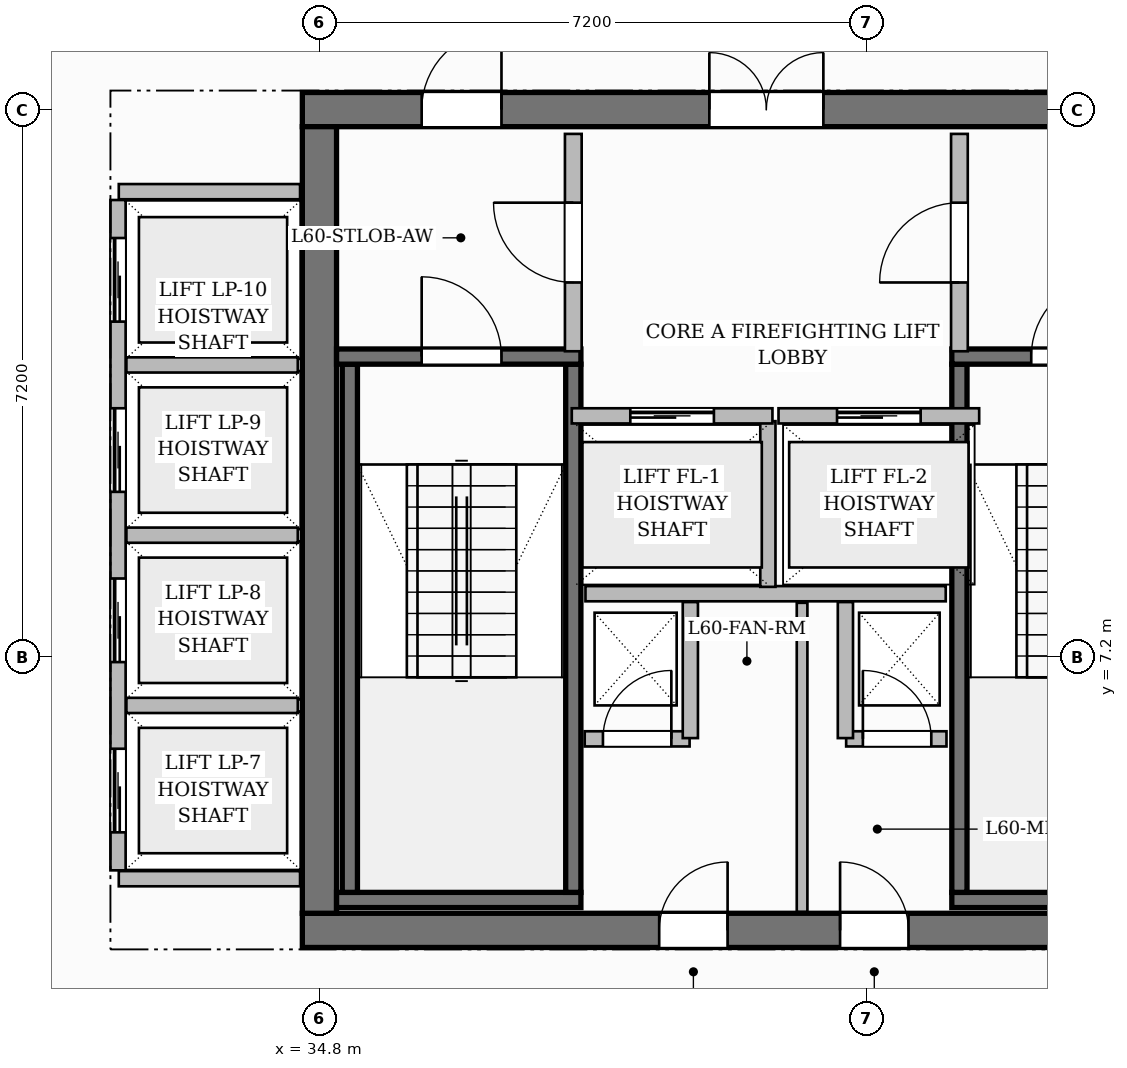
"""IFC4 building model, lengths in metres.
Left out: names, types, materials, properties, quantities, classifications, styles, units other than length and angle.
Written with IfcOpenShell. Run it as: python <this file> out.ifc"""

import sys

from ifc_helpers import new_model, si_unit, direction, frame, frame_2d, origin, place, context, subcontext, project, spatial, rectangle, extrude, source, transform, mapped, element, fill, save


model = new_model("IFC4")
c1 = context("Model", 3, precision=1e-05, world=origin(), true_north=direction((0.0, 1.0)))
c2 = subcontext(c1, "Body", "Model", "MODEL_VIEW")
j1 = project(units=[si_unit("LENGTHUNIT", "METRE"), si_unit("PLANEANGLEUNIT", "RADIAN")], contexts=[c1])
p1 = place(None, origin())
s1 = spatial("IfcSite", under=j1, at=p1, CompositionType="ELEMENT")
p2 = place(p1, origin())
s2 = spatial("IfcBuilding", under=s1, at=p2, CompositionType="ELEMENT")
p3 = place(p2, frame((0.0, 0.0, 240.4)))
s3 = spatial("IfcBuildingStorey", under=s2, at=p3, CompositionType="ELEMENT", Elevation=240.4)
p4 = place(p3, frame((34.575, 3.6, 0.0), z_axis=(0.0, 0.0, 1.0), x_axis=(1.0, 0.0, 0.0)))
e1 = element("IfcWall", 1, at=p4, inside=s3, PredefinedType="SHEAR", context=c2, shape_type="SweptSolid", body=[
    extrude(rectangle(XDim=15.45, YDim=0.45, at=frame_2d((7.725, 0.0))), origin(), (0.0, 0.0, 1.0), 3.85),
])
p5 = place(p4, frame((4.695, 0.0, 0.0)))
e2 = element("IfcOpeningElement", 2, at=p5, cuts=e1, PredefinedType="OPENING", context=c2, shape_type="SweptSolid", body=[
    extrude(rectangle(XDim=0.9, YDim=2.1, at=frame_2d((0.45, 1.05))), frame((0.0, 0.235, 0.0), z_axis=(0.0, -1.0, 0.0), x_axis=(1.0, 0.0, 0.0)), (0.0, 0.0, 1.0), 0.47),
])
p6 = place(p4, frame((7.075, 0.0, 0.0)))
e3 = element("IfcOpeningElement", 3, at=p6, cuts=e1, PredefinedType="OPENING", context=c2, shape_type="SweptSolid", body=[
    extrude(rectangle(XDim=0.9, YDim=2.1, at=frame_2d((0.45, 1.05))), frame((0.0, 0.235, 0.0), z_axis=(0.0, -1.0, 0.0), x_axis=(1.0, 0.0, 0.0)), (0.0, 0.0, 1.0), 0.47),
])
p7 = place(p3, frame((34.575, 14.4, 0.0), z_axis=(0.0, 0.0, 1.0), x_axis=(1.0, 0.0, 0.0)))
e4 = element("IfcWall", 4, at=p7, inside=s3, PredefinedType="SHEAR", context=c2, shape_type="SweptSolid", body=[
    extrude(rectangle(XDim=15.45, YDim=0.45, at=frame_2d((7.725, 0.0))), origin(), (0.0, 0.0, 1.0), 3.85),
])
p8 = place(p7, frame((5.355, 0.0, 0.0)))
e5 = element("IfcOpeningElement", 5, at=p8, cuts=e4, PredefinedType="OPENING", context=c2, shape_type="SweptSolid", body=[
    extrude(rectangle(XDim=1.5, YDim=2.2, at=frame_2d((0.75, 1.1))), frame((0.0, 0.235, 0.0), z_axis=(0.0, -1.0, 0.0), x_axis=(1.0, 0.0, 0.0)), (0.0, 0.0, 1.0), 0.47),
])
p9 = place(p7, frame((1.57, 0.0, 0.0)))
e6 = element("IfcOpeningElement", 6, at=p9, cuts=e4, PredefinedType="OPENING", context=c2, shape_type="SweptSolid", body=[
    extrude(rectangle(XDim=1.05, YDim=2.15, at=frame_2d((0.525, 1.075))), frame((0.0, 0.235, 0.0), z_axis=(0.0, -1.0, 0.0), x_axis=(1.0, 0.0, 0.0)), (0.0, 0.0, 1.0), 0.47),
])
p10 = place(p7, frame((11.2, 0.0, 0.0)))
e7 = element("IfcOpeningElement", 7, at=p10, cuts=e4, PredefinedType="OPENING", context=c2, shape_type="SweptSolid", body=[
    extrude(rectangle(XDim=1.05, YDim=2.15, at=frame_2d((0.525, 1.075))), frame((0.0, 0.235, 0.0), z_axis=(0.0, -1.0, 0.0), x_axis=(1.0, 0.0, 0.0)), (0.0, 0.0, 1.0), 0.47),
])
p11 = place(p3, frame((34.8, 3.825, 0.0), z_axis=(0.0, 0.0, 1.0), x_axis=(0.0, 1.0, 0.0)))
e8 = element("IfcWall", 8, at=p11, inside=s3, PredefinedType="SHEAR", context=c2, shape_type="SweptSolid", body=[
    extrude(rectangle(XDim=10.35, YDim=0.45, at=frame_2d((5.175, 0.0))), origin(), (0.0, 0.0, 1.0), 3.85),
])
p12 = place(p3, frame((35.025, 4.0, 0.0), z_axis=(0.0, 0.0, 1.0), x_axis=(1.0, 0.0, 0.0)))
e9 = element("IfcWall", 9, at=p12, inside=s3, PredefinedType="SHEAR", context=c2, shape_type="SweptSolid", body=[
    extrude(rectangle(XDim=3.215, YDim=0.2, at=frame_2d((1.607, 0.0))), origin(), (0.0, 0.0, 1.0), 3.85),
])
for number, where, z_axis, x_axis in (
    (10, (35.2, 4.1, 0.0), (0.0, 0.0, 1.0), (0.0, 1.0, 0.0)),
    (11, (38.14, 4.1, 0.0), (0.0, 0.0, 1.0), (0.0, 1.0, 0.0)),
):
    element("IfcWall", number, at=place(p3, frame(where, z_axis=z_axis, x_axis=x_axis)), inside=s3, PredefinedType="SHEAR", context=c2, shape_type="SweptSolid", body=[
        extrude(rectangle(XDim=6.95, YDim=0.2, at=frame_2d((3.475, 0.0))), origin(), (0.0, 0.0, 1.0), 3.85),
    ])
p13 = place(p3, frame((35.025, 11.15, 0.0), z_axis=(0.0, 0.0, 1.0), x_axis=(1.0, 0.0, 0.0)))
e12 = element("IfcWall", 12, at=p13, inside=s3, PredefinedType="SHEAR", context=c2, shape_type="SweptSolid", body=[
    extrude(rectangle(XDim=3.215, YDim=0.2, at=frame_2d((1.607, 0.0))), origin(), (0.0, 0.0, 1.0), 3.85),
])
p14 = place(p13, frame((1.12, 0.0, 0.0)))
e13 = element("IfcOpeningElement", 13, at=p14, cuts=e12, PredefinedType="OPENING", context=c2, shape_type="SweptSolid", body=[
    extrude(rectangle(XDim=1.05, YDim=2.2, at=frame_2d((0.525, 1.1))), frame((0.0, 0.11, 0.0), z_axis=(0.0, -1.0, 0.0), x_axis=(1.0, 0.0, 0.0)), (0.0, 0.0, 1.0), 0.22),
])
p15 = place(p3, frame((43.12, 4.0, 0.0), z_axis=(0.0, 0.0, 1.0), x_axis=(1.0, 0.0, 0.0)))
e14 = element("IfcWall", 14, at=p15, inside=s3, PredefinedType="SHEAR", context=c2, shape_type="SweptSolid", body=[
    extrude(rectangle(XDim=6.455, YDim=0.2, at=frame_2d((3.228, 0.0))), origin(), (0.0, 0.0, 1.0), 3.85),
])
p16 = place(p3, frame((43.22, 4.1, 0.0), z_axis=(0.0, 0.0, 1.0), x_axis=(0.0, 1.0, 0.0)))
e15 = element("IfcWall", 15, at=p16, inside=s3, PredefinedType="SHEAR", context=c2, shape_type="SweptSolid", body=[
    extrude(rectangle(XDim=6.95, YDim=0.2, at=frame_2d((3.475, 0.0))), origin(), (0.0, 0.0, 1.0), 3.85),
])
p17 = place(p3, frame((43.12, 11.15, 0.0), z_axis=(0.0, 0.0, 1.0), x_axis=(1.0, 0.0, 0.0)))
e16 = element("IfcWall", 16, at=p17, inside=s3, PredefinedType="SHEAR", context=c2, shape_type="SweptSolid", body=[
    extrude(rectangle(XDim=6.455, YDim=0.2, at=frame_2d((3.228, 0.0))), origin(), (0.0, 0.0, 1.0), 3.85),
])
p18 = place(p17, frame((1.045, 0.0, 0.0)))
e17 = element("IfcOpeningElement", 17, at=p18, cuts=e16, PredefinedType="OPENING", context=c2, shape_type="SweptSolid", body=[
    extrude(rectangle(XDim=1.05, YDim=2.2, at=frame_2d((0.525, 1.1))), frame((0.0, 0.11, 0.0), z_axis=(0.0, -1.0, 0.0), x_axis=(1.0, 0.0, 0.0)), (0.0, 0.0, 1.0), 0.22),
])
p19 = place(p17, frame((4.125, 0.0, 0.0)))
e18 = element("IfcOpeningElement", 18, at=p19, cuts=e16, PredefinedType="OPENING", context=c2, shape_type="SweptSolid", body=[
    extrude(rectangle(XDim=1.05, YDim=2.2, at=frame_2d((0.525, 1.1))), frame((0.0, 0.11, 0.0), z_axis=(0.0, -1.0, 0.0), x_axis=(1.0, 0.0, 0.0)), (0.0, 0.0, 1.0), 0.22),
])
p20 = place(p3, frame((38.3, 8.03, 0.0), z_axis=(0.0, 0.0, 1.0), x_axis=(1.0, 0.0, 0.0)))
e19 = element("IfcWall", 19, at=p20, inside=s3, PredefinedType="PARTITIONING", context=c2, shape_type="SweptSolid", body=[
    extrude(rectangle(XDim=4.74, YDim=0.2, at=frame_2d((2.37, 0.0))), origin(), (0.0, 0.0, 1.0), 3.6),
])
p21 = place(p3, frame((40.7, 8.12, 0.0), z_axis=(0.0, 0.0, 1.0), x_axis=(0.0, 1.0, 0.0)))
e20 = element("IfcWall", 20, at=p21, inside=s3, PredefinedType="PARTITIONING", context=c2, shape_type="SweptSolid", body=[
    extrude(rectangle(XDim=2.18, YDim=0.2, at=frame_2d((1.09, 0.0))), origin(), (0.0, 0.0, 1.0), 3.6),
])
p22 = place(p3, frame((38.14, 11.22, 0.0), z_axis=(0.0, 0.0, 1.0), x_axis=(0.0, 1.0, 0.0)))
e21 = element("IfcWall", 21, at=p22, inside=s3, PredefinedType="PARTITIONING", context=c2, shape_type="SweptSolid", body=[
    extrude(rectangle(XDim=2.86, YDim=0.22, at=frame_2d((1.43, 0.0))), origin(), (0.0, 0.0, 1.0), 3.6),
])
p23 = place(p22, frame((0.905, 0.0, 0.0)))
e22 = element("IfcOpeningElement", 22, at=p23, cuts=e21, PredefinedType="OPENING", context=c2, shape_type="SweptSolid", body=[
    extrude(rectangle(XDim=1.05, YDim=2.15, at=frame_2d((0.525, 1.075))), frame((0.0, 0.12, 0.0), z_axis=(0.0, -1.0, 0.0), x_axis=(1.0, 0.0, 0.0)), (0.0, 0.0, 1.0), 0.24),
])
p24 = place(p3, frame((43.22, 11.22, 0.0), z_axis=(0.0, 0.0, 1.0), x_axis=(0.0, 1.0, 0.0)))
e23 = element("IfcWall", 23, at=p24, inside=s3, PredefinedType="PARTITIONING", context=c2, shape_type="SweptSolid", body=[
    extrude(rectangle(XDim=2.86, YDim=0.22, at=frame_2d((1.43, 0.0))), origin(), (0.0, 0.0, 1.0), 3.6),
])
p25 = place(p24, frame((0.905, 0.0, 0.0)))
e24 = element("IfcOpeningElement", 24, at=p25, cuts=e23, PredefinedType="OPENING", context=c2, shape_type="SweptSolid", body=[
    extrude(rectangle(XDim=1.05, YDim=2.15, at=frame_2d((0.525, 1.075))), frame((0.0, 0.12, 0.0), z_axis=(0.0, -1.0, 0.0), x_axis=(1.0, 0.0, 0.0)), (0.0, 0.0, 1.0), 0.24),
])
p26 = place(p3, frame((38.29, 6.12, 0.0), z_axis=(0.0, 0.0, 1.0), x_axis=(1.0, 0.0, 0.0)))
e25 = element("IfcWall", 25, at=p26, inside=s3, PredefinedType="PARTITIONING", context=c2, shape_type="SweptSolid", body=[
    extrude(rectangle(XDim=1.38, YDim=0.2, at=frame_2d((0.69, 0.0))), origin(), (0.0, 0.0, 1.0), 3.6),
])
p27 = place(p26, frame((0.24, 0.0, 0.0)))
e26 = element("IfcOpeningElement", 26, at=p27, cuts=e25, PredefinedType="OPENING", context=c2, shape_type="SweptSolid", body=[
    extrude(rectangle(XDim=0.9, YDim=2.1, at=frame_2d((0.45, 1.05))), frame((0.0, 0.11, 0.0), z_axis=(0.0, -1.0, 0.0), x_axis=(1.0, 0.0, 0.0)), (0.0, 0.0, 1.0), 0.22),
])
p28 = place(p3, frame((39.68, 6.13, 0.0), z_axis=(0.0, 0.0, 1.0), x_axis=(0.0, 1.0, 0.0)))
e27 = element("IfcWall", 27, at=p28, inside=s3, PredefinedType="PARTITIONING", context=c2, shape_type="SweptSolid", body=[
    extrude(rectangle(XDim=1.79, YDim=0.2, at=frame_2d((0.895, 0.0))), origin(), (0.0, 0.0, 1.0), 3.6),
])
p29 = place(p3, frame((41.73, 6.12, 0.0), z_axis=(0.0, 0.0, 1.0), x_axis=(1.0, 0.0, 0.0)))
e28 = element("IfcWall", 28, at=p29, inside=s3, PredefinedType="PARTITIONING", context=c2, shape_type="SweptSolid", body=[
    extrude(rectangle(XDim=1.32, YDim=0.2, at=frame_2d((0.66, 0.0))), origin(), (0.0, 0.0, 1.0), 3.6),
])
p30 = place(p29, frame((0.22, 0.0, 0.0)))
e29 = element("IfcOpeningElement", 29, at=p30, cuts=e28, PredefinedType="OPENING", context=c2, shape_type="SweptSolid", body=[
    extrude(rectangle(XDim=0.9, YDim=2.1, at=frame_2d((0.45, 1.05))), frame((0.0, 0.11, 0.0), z_axis=(0.0, -1.0, 0.0), x_axis=(1.0, 0.0, 0.0)), (0.0, 0.0, 1.0), 0.22),
])
p31 = place(p3, frame((41.72, 6.13, 0.0), z_axis=(0.0, 0.0, 1.0), x_axis=(0.0, 1.0, 0.0)))
e30 = element("IfcWall", 30, at=p31, inside=s3, PredefinedType="PARTITIONING", context=c2, shape_type="SweptSolid", body=[
    extrude(rectangle(XDim=1.79, YDim=0.2, at=frame_2d((0.895, 0.0))), origin(), (0.0, 0.0, 1.0), 3.6),
])
p32 = place(p3, frame((41.15, 3.845, 0.0), z_axis=(0.0, 0.0, 1.0), x_axis=(0.0, 1.0, 0.0)))
e31 = element("IfcWall", 31, at=p32, inside=s3, PredefinedType="PARTITIONING", context=c2, shape_type="SweptSolid", body=[
    extrude(rectangle(XDim=4.065, YDim=0.14, at=frame_2d((2.032, 0.0))), origin(), (0.0, 0.0, 1.0), 3.6),
])
for number, where, z_axis, x_axis in (
    (32, (32.16, 4.28, 0.0), (0.0, 0.0, 1.0), (1.0, 0.0, 0.0)),
    (33, (32.16, 13.32, 0.0), (0.0, 0.0, 1.0), (1.0, 0.0, 0.0)),
):
    element("IfcWall", number, at=place(p3, frame(where, z_axis=z_axis, x_axis=x_axis)), inside=s3, PredefinedType="PARTITIONING", context=c2, shape_type="SweptSolid", body=[
        extrude(rectangle(XDim=2.385, YDim=0.2, at=frame_2d((1.192, 0.0))), origin(), (0.0, 0.0, 1.0), 3.6),
    ])
p33 = place(p3, frame((32.15, 4.39, 0.0), z_axis=(0.0, 0.0, 1.0), x_axis=(0.0, 1.0, 0.0)))
e34 = element("IfcWall", 34, at=p33, inside=s3, PredefinedType="PARTITIONING", context=c2, shape_type="SweptSolid", body=[
    extrude(rectangle(XDim=8.82, YDim=0.2, at=frame_2d((4.41, 0.0))), origin(), (0.0, 0.0, 1.0), 3.6),
])
p34 = place(p33, frame((0.5, 0.0, 0.0)))
e35 = element("IfcOpeningElement", 35, at=p34, cuts=e34, PredefinedType="OPENING", context=c2, shape_type="SweptSolid", body=[
    extrude(rectangle(XDim=1.1, YDim=2.2, at=frame_2d((0.55, 1.1))), frame((0.0, 0.11, 0.0), z_axis=(0.0, -1.0, 0.0), x_axis=(1.0, 0.0, 0.0)), (0.0, 0.0, 1.0), 0.22),
])
p35 = place(p33, frame((2.74, 0.0, 0.0)))
e36 = element("IfcOpeningElement", 36, at=p35, cuts=e34, PredefinedType="OPENING", context=c2, shape_type="SweptSolid", body=[
    extrude(rectangle(XDim=1.1, YDim=2.2, at=frame_2d((0.55, 1.1))), frame((0.0, 0.11, 0.0), z_axis=(0.0, -1.0, 0.0), x_axis=(1.0, 0.0, 0.0)), (0.0, 0.0, 1.0), 0.22),
])
p36 = place(p33, frame((4.98, 0.0, 0.0)))
e37 = element("IfcOpeningElement", 37, at=p36, cuts=e34, PredefinedType="OPENING", context=c2, shape_type="SweptSolid", body=[
    extrude(rectangle(XDim=1.1, YDim=2.2, at=frame_2d((0.55, 1.1))), frame((0.0, 0.11, 0.0), z_axis=(0.0, -1.0, 0.0), x_axis=(1.0, 0.0, 0.0)), (0.0, 0.0, 1.0), 0.22),
])
p37 = place(p33, frame((7.22, 0.0, 0.0)))
e38 = element("IfcOpeningElement", 38, at=p37, cuts=e34, PredefinedType="OPENING", context=c2, shape_type="SweptSolid", body=[
    extrude(rectangle(XDim=1.1, YDim=2.2, at=frame_2d((0.55, 1.1))), frame((0.0, 0.11, 0.0), z_axis=(0.0, -1.0, 0.0), x_axis=(1.0, 0.0, 0.0)), (0.0, 0.0, 1.0), 0.22),
])
for number, where, z_axis, x_axis in (
    (39, (32.26, 6.56, 0.0), (0.0, 0.0, 1.0), (1.0, 0.0, 0.0)),
    (40, (32.26, 8.8, 0.0), (0.0, 0.0, 1.0), (1.0, 0.0, 0.0)),
    (41, (32.26, 11.04, 0.0), (0.0, 0.0, 1.0), (1.0, 0.0, 0.0)),
):
    element("IfcWall", number, at=place(p3, frame(where, z_axis=z_axis, x_axis=x_axis)), inside=s3, PredefinedType="PARTITIONING", context=c2, shape_type="SweptSolid", body=[
        extrude(rectangle(XDim=2.255, YDim=0.2, at=frame_2d((1.127, 0.0))), origin(), (0.0, 0.0, 1.0), 3.6),
    ])
p38 = place(p3, frame((38.12, 10.37, 0.0), z_axis=(0.0, 0.0, 1.0), x_axis=(1.0, 0.0, 0.0)))
e42 = element("IfcWall", 42, at=p38, inside=s3, PredefinedType="PARTITIONING", context=c2, shape_type="SweptSolid", body=[
    extrude(rectangle(XDim=2.64, YDim=0.2, at=frame_2d((1.32, 0.0))), origin(), (0.0, 0.0, 1.0), 3.6),
])
p39 = place(p38, frame((0.77, 0.0, 0.0)))
e43 = element("IfcOpeningElement", 43, at=p39, cuts=e42, PredefinedType="OPENING", context=c2, shape_type="SweptSolid", body=[
    extrude(rectangle(XDim=1.1, YDim=2.2, at=frame_2d((0.55, 1.1))), frame((0.0, 0.11, 0.0), z_axis=(0.0, -1.0, 0.0), x_axis=(1.0, 0.0, 0.0)), (0.0, 0.0, 1.0), 0.22),
])
p40 = place(p3, frame((40.84, 10.37, 0.0), z_axis=(0.0, 0.0, 1.0), x_axis=(1.0, 0.0, 0.0)))
e44 = element("IfcWall", 44, at=p40, inside=s3, PredefinedType="PARTITIONING", context=c2, shape_type="SweptSolid", body=[
    extrude(rectangle(XDim=2.64, YDim=0.2, at=frame_2d((1.32, 0.0))), origin(), (0.0, 0.0, 1.0), 3.6),
])
p41 = place(p40, frame((0.77, 0.0, 0.0)))
e45 = element("IfcOpeningElement", 45, at=p41, cuts=e44, PredefinedType="OPENING", context=c2, shape_type="SweptSolid", body=[
    extrude(rectangle(XDim=1.1, YDim=2.2, at=frame_2d((0.55, 1.1))), frame((0.0, 0.11, 0.0), z_axis=(0.0, -1.0, 0.0), x_axis=(1.0, 0.0, 0.0)), (0.0, 0.0, 1.0), 0.22),
])
m1 = source(origin(), c2, "Body", "SweptSolid", [
    extrude(rectangle(XDim=1.05, YDim=2.2, at=frame_2d((0.525, 1.1))), frame((0.0, 0.025, 0.0), z_axis=(0.0, -1.0, 0.0), x_axis=(1.0, 0.0, 0.0)), (0.0, 0.0, 1.0), 0.05),
])
p42 = place(p14, origin())
e46 = element("IfcDoor", 46, at=p42, inside=s3, OperationType="SINGLE_SWING_LEFT", PredefinedType="DOOR", context=c2, shape_type="MappedRepresentation", body=[
    mapped(m1, transform((0.0, 0.0, 0.0), scale=1.0)),
])
fill(e13, e46)
p43 = place(p18, origin())
e47 = element("IfcDoor", 47, at=p43, inside=s3, OperationType="SINGLE_SWING_RIGHT", PredefinedType="DOOR", context=c2, shape_type="MappedRepresentation", body=[
    mapped(m1, transform((0.0, 0.0, 0.0), scale=1.0)),
])
fill(e17, e47)
m2 = source(origin(), c2, "Body", "SweptSolid", [
    extrude(rectangle(XDim=1.05, YDim=2.15, at=frame_2d((0.525, 1.075))), frame((0.0, 0.025, 0.0), z_axis=(0.0, -1.0, 0.0), x_axis=(1.0, 0.0, 0.0)), (0.0, 0.0, 1.0), 0.05),
])
p44 = place(p23, origin())
e48 = element("IfcDoor", 48, at=p44, inside=s3, OperationType="SINGLE_SWING_RIGHT", PredefinedType="DOOR", context=c2, shape_type="MappedRepresentation", body=[
    mapped(m2, transform((0.0, 0.0, 0.0), scale=1.0)),
])
fill(e22, e48)
p45 = place(p25, origin())
e49 = element("IfcDoor", 49, at=p45, inside=s3, OperationType="SINGLE_SWING_LEFT", PredefinedType="DOOR", context=c2, shape_type="MappedRepresentation", body=[
    mapped(m2, transform((0.0, 0.0, 0.0), scale=1.0)),
])
fill(e24, e49)
m3 = source(origin(), c2, "Body", "SweptSolid", [
    extrude(rectangle(XDim=1.5, YDim=2.2, at=frame_2d((0.75, 1.1))), frame((0.0, 0.025, 0.0), z_axis=(0.0, -1.0, 0.0), x_axis=(1.0, 0.0, 0.0)), (0.0, 0.0, 1.0), 0.05),
])
p46 = place(p8, origin())
e50 = element("IfcDoor", 50, at=p46, inside=s3, OperationType="DOUBLE_DOOR_SINGLE_SWING", PredefinedType="DOOR", context=c2, shape_type="MappedRepresentation", body=[
    mapped(m3, transform((0.0, 0.0, 0.0), scale=1.0)),
])
fill(e5, e50)
p47 = place(p9, origin())
e51 = element("IfcDoor", 51, at=p47, inside=s3, OperationType="SINGLE_SWING_RIGHT", PredefinedType="DOOR", context=c2, shape_type="MappedRepresentation", body=[
    mapped(m2, transform((0.0, 0.0, 0.0), scale=1.0)),
])
fill(e6, e51)
m4 = source(origin(), c2, "Body", "SweptSolid", [
    extrude(rectangle(XDim=0.9, YDim=2.1, at=frame_2d((0.45, 1.05))), frame((0.0, 0.025, 0.0), z_axis=(0.0, -1.0, 0.0), x_axis=(1.0, 0.0, 0.0)), (0.0, 0.0, 1.0), 0.05),
])
p48 = place(p27, origin())
e52 = element("IfcDoor", 52, at=p48, inside=s3, OperationType="SINGLE_SWING_RIGHT", PredefinedType="DOOR", context=c2, shape_type="MappedRepresentation", body=[
    mapped(m4, transform((0.0, 0.0, 0.0), scale=1.0)),
])
fill(e26, e52)
p49 = place(p30, origin())
e53 = element("IfcDoor", 53, at=p49, inside=s3, OperationType="SINGLE_SWING_LEFT", PredefinedType="DOOR", context=c2, shape_type="MappedRepresentation", body=[
    mapped(m4, transform((0.0, 0.0, 0.0), scale=1.0)),
])
fill(e29, e53)
p50 = place(p5, origin())
e54 = element("IfcDoor", 54, at=p50, inside=s3, OperationType="SINGLE_SWING_RIGHT", PredefinedType="DOOR", context=c2, shape_type="MappedRepresentation", body=[
    mapped(m4, transform((0.0, 0.0, 0.0), scale=1.0)),
])
fill(e2, e54)
p51 = place(p6, origin())
e55 = element("IfcDoor", 55, at=p51, inside=s3, OperationType="SINGLE_SWING_LEFT", PredefinedType="DOOR", context=c2, shape_type="MappedRepresentation", body=[
    mapped(m4, transform((0.0, 0.0, 0.0), scale=1.0)),
])
fill(e3, e55)
m5 = source(origin(), c2, "Body", "SweptSolid", [
    extrude(rectangle(XDim=1.1, YDim=2.2, at=frame_2d((0.55, 1.1))), frame((0.0, 0.025, 0.0), z_axis=(0.0, -1.0, 0.0), x_axis=(1.0, 0.0, 0.0)), (0.0, 0.0, 1.0), 0.05),
])
p52 = place(p39, origin())
e56 = element("IfcDoor", 56, at=p52, inside=s3, OperationType="SLIDING_TO_LEFT", PredefinedType="DOOR", context=c2, shape_type="MappedRepresentation", body=[
    mapped(m5, transform((0.0, 0.0, 0.0), scale=1.0)),
])
fill(e43, e56)
p53 = place(p41, origin())
e57 = element("IfcDoor", 57, at=p53, inside=s3, OperationType="SLIDING_TO_LEFT", PredefinedType="DOOR", context=c2, shape_type="MappedRepresentation", body=[
    mapped(m5, transform((0.0, 0.0, 0.0), scale=1.0)),
])
fill(e45, e57)
p54 = place(p34, origin())
e58 = element("IfcDoor", 58, at=p54, inside=s3, OperationType="SLIDING_TO_LEFT", PredefinedType="DOOR", context=c2, shape_type="MappedRepresentation", body=[
    mapped(m5, transform((0.0, 0.0, 0.0), scale=1.0)),
])
fill(e35, e58)
p55 = place(p35, origin())
e59 = element("IfcDoor", 59, at=p55, inside=s3, OperationType="SLIDING_TO_LEFT", PredefinedType="DOOR", context=c2, shape_type="MappedRepresentation", body=[
    mapped(m5, transform((0.0, 0.0, 0.0), scale=1.0)),
])
fill(e36, e59)
p56 = place(p36, origin())
e60 = element("IfcDoor", 60, at=p56, inside=s3, OperationType="SLIDING_TO_LEFT", PredefinedType="DOOR", context=c2, shape_type="MappedRepresentation", body=[
    mapped(m5, transform((0.0, 0.0, 0.0), scale=1.0)),
])
fill(e37, e60)
p57 = place(p37, origin())
e61 = element("IfcDoor", 61, at=p57, inside=s3, OperationType="SLIDING_TO_LEFT", PredefinedType="DOOR", context=c2, shape_type="MappedRepresentation", body=[
    mapped(m5, transform((0.0, 0.0, 0.0), scale=1.0)),
])
fill(e38, e61)
save(model, sys.argv[1])
